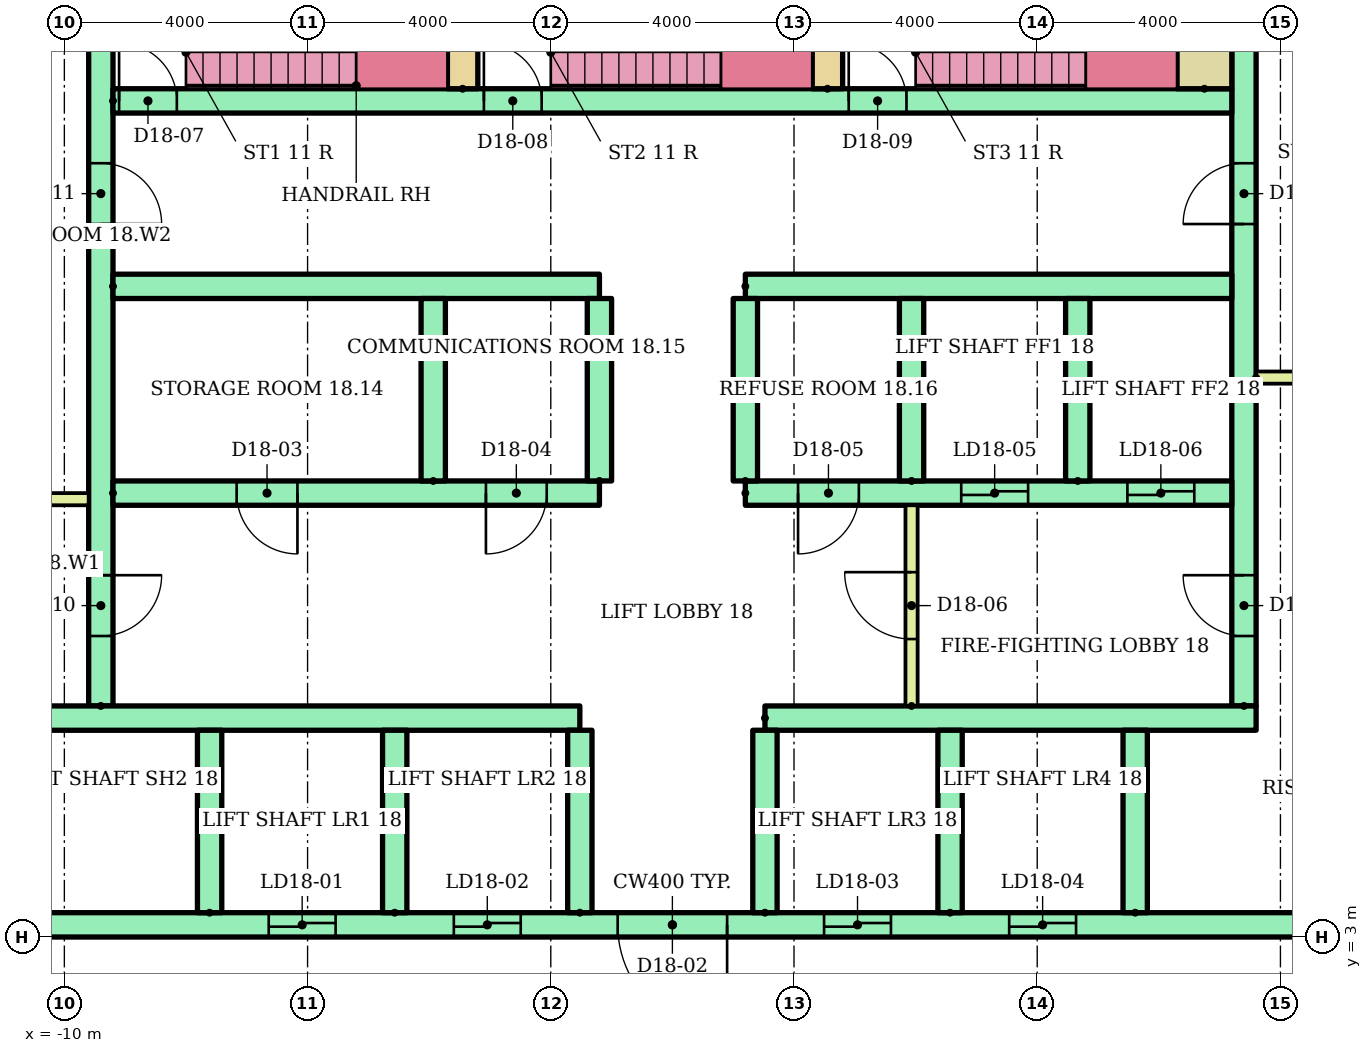
"""IFC4 building model, lengths in metres.
Left out: names, types, materials, properties, quantities, classifications, styles, units other than length and angle.
Written with IfcOpenShell. Run it as: python <this file> out.ifc"""

import sys

from ifc_helpers import new_model, si_unit, direction, frame, frame_2d, origin, place, context, subcontext, project, spatial, rectangle, extrude, element, fill, save


model = new_model("IFC4")
c1 = context("Model", 3, precision=1e-05, world=origin(), true_north=direction((0.0, 1.0)))
c2 = subcontext(c1, "Body", "Model", "MODEL_VIEW")
j1 = project(units=[si_unit("LENGTHUNIT", "METRE"), si_unit("PLANEANGLEUNIT", "RADIAN")], contexts=[c1])
p1 = place(None, origin())
s1 = spatial("IfcSite", under=j1, at=p1, CompositionType="ELEMENT")
p2 = place(p1, origin())
s2 = spatial("IfcBuilding", under=s1, at=p2, CompositionType="ELEMENT")
p3 = place(p2, frame((0.0, 0.0, 73.6)))
s3 = spatial("IfcBuildingStorey", under=s2, at=p3, CompositionType="ELEMENT", Elevation=73.6)
p4 = place(p3, frame((-9.4, 6.8, 0.0), z_axis=(0.0, 0.0, 1.0), x_axis=(0.0, 1.0, 0.0)))
e1 = element("IfcWall", 1, at=p4, inside=s3, PredefinedType="SHEAR", context=c2, shape_type="SweptSolid", body=[
    extrude(rectangle(XDim=12.7, YDim=0.4, at=frame_2d((6.35, 0.0))), origin(), (0.0, 0.0, 1.0), 3.62),
])
p5 = place(p4, frame((1.15, 0.0, 0.0)))
e2 = element("IfcOpeningElement", 2, at=p5, cuts=e1, PredefinedType="OPENING", context=c2, shape_type="SweptSolid", body=[
    extrude(rectangle(XDim=1.0, YDim=2.1, at=frame_2d((0.5, 1.05))), frame((0.0, 0.21, 0.0), z_axis=(0.0, -1.0, 0.0), x_axis=(1.0, 0.0, 0.0)), (0.0, 0.0, 1.0), 0.42),
])
p6 = place(p4, frame((7.925, 0.0, 0.0)))
e3 = element("IfcOpeningElement", 3, at=p6, cuts=e1, PredefinedType="OPENING", context=c2, shape_type="SweptSolid", body=[
    extrude(rectangle(XDim=1.0, YDim=2.1, at=frame_2d((0.5, 1.05))), frame((0.0, 0.21, 0.0), z_axis=(0.0, -1.0, 0.0), x_axis=(1.0, 0.0, 0.0)), (0.0, 0.0, 1.0), 0.42),
])
p7 = place(p3, frame((9.4, 6.8, 0.0), z_axis=(0.0, 0.0, 1.0), x_axis=(0.0, 1.0, 0.0)))
e4 = element("IfcWall", 4, at=p7, inside=s3, PredefinedType="SHEAR", context=c2, shape_type="SweptSolid", body=[
    extrude(rectangle(XDim=12.7, YDim=0.4, at=frame_2d((6.35, 0.0))), origin(), (0.0, 0.0, 1.0), 3.62),
])
p8 = place(p7, frame((1.15, 0.0, 0.0)))
e5 = element("IfcOpeningElement", 5, at=p8, cuts=e4, PredefinedType="OPENING", context=c2, shape_type="SweptSolid", body=[
    extrude(rectangle(XDim=1.0, YDim=2.1, at=frame_2d((0.5, 1.05))), frame((0.0, 0.21, 0.0), z_axis=(0.0, -1.0, 0.0), x_axis=(1.0, 0.0, 0.0)), (0.0, 0.0, 1.0), 0.42),
])
p9 = place(p7, frame((7.925, 0.0, 0.0)))
e6 = element("IfcOpeningElement", 6, at=p9, cuts=e4, PredefinedType="OPENING", context=c2, shape_type="SweptSolid", body=[
    extrude(rectangle(XDim=1.0, YDim=2.1, at=frame_2d((0.5, 1.05))), frame((0.0, 0.21, 0.0), z_axis=(0.0, -1.0, 0.0), x_axis=(1.0, 0.0, 0.0)), (0.0, 0.0, 1.0), 0.42),
])
p10 = place(p3, frame((-13.5, 3.2, 0.0)))
e7 = element("IfcWall", 7, at=p10, inside=s3, PredefinedType="SHEAR", context=c2, shape_type="SweptSolid", body=[
    extrude(rectangle(XDim=27.0, YDim=0.4, at=frame_2d((13.5, 0.0))), origin(), (0.0, 0.0, 1.0), 3.62),
])
p11 = place(p10, frame((6.861, 0.0, 0.0)))
e8 = element("IfcOpeningElement", 8, at=p11, cuts=e7, PredefinedType="OPENING", context=c2, shape_type="SweptSolid", body=[
    extrude(rectangle(XDim=1.1, YDim=2.1, at=frame_2d((0.55, 1.05))), frame((0.0, 0.21, 0.0), z_axis=(0.0, -1.0, 0.0), x_axis=(1.0, 0.0, 0.0)), (0.0, 0.0, 1.0), 0.42),
])
p12 = place(p10, frame((9.906, 0.0, 0.0)))
e9 = element("IfcOpeningElement", 9, at=p12, cuts=e7, PredefinedType="OPENING", context=c2, shape_type="SweptSolid", body=[
    extrude(rectangle(XDim=1.1, YDim=2.1, at=frame_2d((0.55, 1.05))), frame((0.0, 0.21, 0.0), z_axis=(0.0, -1.0, 0.0), x_axis=(1.0, 0.0, 0.0)), (0.0, 0.0, 1.0), 0.42),
])
p13 = place(p10, frame((15.994, 0.0, 0.0)))
e10 = element("IfcOpeningElement", 10, at=p13, cuts=e7, PredefinedType="OPENING", context=c2, shape_type="SweptSolid", body=[
    extrude(rectangle(XDim=1.1, YDim=2.1, at=frame_2d((0.55, 1.05))), frame((0.0, 0.21, 0.0), z_axis=(0.0, -1.0, 0.0), x_axis=(1.0, 0.0, 0.0)), (0.0, 0.0, 1.0), 0.42),
])
p14 = place(p10, frame((19.039, 0.0, 0.0)))
e11 = element("IfcOpeningElement", 11, at=p14, cuts=e7, PredefinedType="OPENING", context=c2, shape_type="SweptSolid", body=[
    extrude(rectangle(XDim=1.1, YDim=2.1, at=frame_2d((0.55, 1.05))), frame((0.0, 0.21, 0.0), z_axis=(0.0, -1.0, 0.0), x_axis=(1.0, 0.0, 0.0)), (0.0, 0.0, 1.0), 0.42),
])
p15 = place(p10, frame((12.6, 0.0, 0.0)))
e12 = element("IfcOpeningElement", 12, at=p15, cuts=e7, PredefinedType="OPENING", context=c2, shape_type="SweptSolid", body=[
    extrude(rectangle(XDim=1.8, YDim=2.1, at=frame_2d((0.9, 1.05))), frame((0.0, 0.21, 0.0), z_axis=(0.0, -1.0, 0.0), x_axis=(1.0, 0.0, 0.0)), (0.0, 0.0, 1.0), 0.42),
])
p16 = place(p3, frame((-13.5, 6.6, 0.0)))
e13 = element("IfcWall", 13, at=p16, inside=s3, PredefinedType="SHEAR", context=c2, shape_type="SweptSolid", body=[
    extrude(rectangle(XDim=11.978, YDim=0.4, at=frame_2d((5.989, 0.0))), origin(), (0.0, 0.0, 1.0), 3.62),
])
p17 = place(p3, frame((1.522, 6.6, 0.0)))
e14 = element("IfcWall", 14, at=p17, inside=s3, PredefinedType="SHEAR", context=c2, shape_type="SweptSolid", body=[
    extrude(rectangle(XDim=8.078, YDim=0.4, at=frame_2d((4.039, 0.0))), origin(), (0.0, 0.0, 1.0), 3.62),
])
for number, where, z_axis, x_axis in (
    (15, (-7.611, 3.4, 0.0), (0.0, 0.0, 1.0), (0.0, 1.0, 0.0)),
    (16, (-4.567, 3.4, 0.0), (0.0, 0.0, 1.0), (0.0, 1.0, 0.0)),
    (17, (-1.522, 3.4, 0.0), (0.0, 0.0, 1.0), (0.0, 1.0, 0.0)),
    (18, (1.522, 3.4, 0.0), (0.0, 0.0, 1.0), (0.0, 1.0, 0.0)),
    (19, (4.567, 3.4, 0.0), (0.0, 0.0, 1.0), (0.0, 1.0, 0.0)),
    (20, (7.611, 3.4, 0.0), (0.0, 0.0, 1.0), (0.0, 1.0, 0.0)),
):
    element("IfcWall", number, at=place(p3, frame(where, z_axis=z_axis, x_axis=x_axis)), inside=s3, PredefinedType="SHEAR", context=c2, shape_type="SweptSolid", body=[
        extrude(rectangle(XDim=3.0, YDim=0.4, at=frame_2d((1.5, 0.0))), origin(), (0.0, 0.0, 1.0), 3.62),
    ])
p18 = place(p3, frame((-9.2, 10.3, 0.0)))
e21 = element("IfcWall", 21, at=p18, inside=s3, PredefinedType="SHEAR", context=c2, shape_type="SweptSolid", body=[
    extrude(rectangle(XDim=8.0, YDim=0.4, at=frame_2d((4.0, 0.0))), origin(), (0.0, 0.0, 1.0), 3.62),
])
p19 = place(p18, frame((2.033, 0.0, 0.0)))
e22 = element("IfcOpeningElement", 22, at=p19, cuts=e21, PredefinedType="OPENING", context=c2, shape_type="SweptSolid", body=[
    extrude(rectangle(XDim=1.0, YDim=2.1, at=frame_2d((0.5, 1.05))), frame((0.0, 0.21, 0.0), z_axis=(0.0, -1.0, 0.0), x_axis=(1.0, 0.0, 0.0)), (0.0, 0.0, 1.0), 0.42),
])
p20 = place(p18, frame((6.133, 0.0, 0.0)))
e23 = element("IfcOpeningElement", 23, at=p20, cuts=e21, PredefinedType="OPENING", context=c2, shape_type="SweptSolid", body=[
    extrude(rectangle(XDim=1.0, YDim=2.1, at=frame_2d((0.5, 1.05))), frame((0.0, 0.21, 0.0), z_axis=(0.0, -1.0, 0.0), x_axis=(1.0, 0.0, 0.0)), (0.0, 0.0, 1.0), 0.42),
])
p21 = place(p3, frame((-9.2, 13.7, 0.0)))
e24 = element("IfcWall", 24, at=p21, inside=s3, PredefinedType="SHEAR", context=c2, shape_type="SweptSolid", body=[
    extrude(rectangle(XDim=8.0, YDim=0.4, at=frame_2d((4.0, 0.0))), origin(), (0.0, 0.0, 1.0), 3.62),
])
p22 = place(p3, frame((1.2, 10.3, 0.0)))
e25 = element("IfcWall", 25, at=p22, inside=s3, PredefinedType="SHEAR", context=c2, shape_type="SweptSolid", body=[
    extrude(rectangle(XDim=8.0, YDim=0.4, at=frame_2d((4.0, 0.0))), origin(), (0.0, 0.0, 1.0), 3.62),
])
p23 = place(p22, frame((3.55, 0.0, 0.0)))
e26 = element("IfcOpeningElement", 26, at=p23, cuts=e25, PredefinedType="OPENING", context=c2, shape_type="SweptSolid", body=[
    extrude(rectangle(XDim=1.1, YDim=2.1, at=frame_2d((0.55, 1.05))), frame((0.0, 0.21, 0.0), z_axis=(0.0, -1.0, 0.0), x_axis=(1.0, 0.0, 0.0)), (0.0, 0.0, 1.0), 0.42),
])
p24 = place(p22, frame((6.283, 0.0, 0.0)))
e27 = element("IfcOpeningElement", 27, at=p24, cuts=e25, PredefinedType="OPENING", context=c2, shape_type="SweptSolid", body=[
    extrude(rectangle(XDim=1.1, YDim=2.1, at=frame_2d((0.55, 1.05))), frame((0.0, 0.21, 0.0), z_axis=(0.0, -1.0, 0.0), x_axis=(1.0, 0.0, 0.0)), (0.0, 0.0, 1.0), 0.42),
])
p25 = place(p22, frame((0.867, 0.0, 0.0)))
e28 = element("IfcOpeningElement", 28, at=p25, cuts=e25, PredefinedType="OPENING", context=c2, shape_type="SweptSolid", body=[
    extrude(rectangle(XDim=1.0, YDim=2.1, at=frame_2d((0.5, 1.05))), frame((0.0, 0.21, 0.0), z_axis=(0.0, -1.0, 0.0), x_axis=(1.0, 0.0, 0.0)), (0.0, 0.0, 1.0), 0.42),
])
p26 = place(p3, frame((1.2, 13.7, 0.0)))
e29 = element("IfcWall", 29, at=p26, inside=s3, PredefinedType="SHEAR", context=c2, shape_type="SweptSolid", body=[
    extrude(rectangle(XDim=8.0, YDim=0.4, at=frame_2d((4.0, 0.0))), origin(), (0.0, 0.0, 1.0), 3.62),
])
for number, where, z_axis, x_axis in (
    (30, (-3.933, 10.5, 0.0), (0.0, 0.0, 1.0), (0.0, 1.0, 0.0)),
    (31, (-1.2, 10.5, 0.0), (0.0, 0.0, 1.0), (0.0, 1.0, 0.0)),
    (32, (1.2, 10.5, 0.0), (0.0, 0.0, 1.0), (0.0, 1.0, 0.0)),
    (33, (3.933, 10.5, 0.0), (0.0, 0.0, 1.0), (0.0, 1.0, 0.0)),
    (34, (6.667, 10.5, 0.0), (0.0, 0.0, 1.0), (0.0, 1.0, 0.0)),
):
    element("IfcWall", number, at=place(p3, frame(where, z_axis=z_axis, x_axis=x_axis)), inside=s3, PredefinedType="SHEAR", context=c2, shape_type="SweptSolid", body=[
        extrude(rectangle(XDim=3.0, YDim=0.4, at=frame_2d((1.5, 0.0))), origin(), (0.0, 0.0, 1.0), 3.62),
    ])
p27 = place(p3, frame((3.933, 6.8, 0.0), z_axis=(0.0, 0.0, 1.0), x_axis=(0.0, 1.0, 0.0)))
e35 = element("IfcWall", 35, at=p27, inside=s3, PredefinedType="PARTITIONING", context=c2, shape_type="SweptSolid", body=[
    extrude(rectangle(XDim=3.3, YDim=0.2, at=frame_2d((1.65, 0.0))), origin(), (0.0, 0.0, 1.0), 3.62),
])
p28 = place(p27, frame((1.1, 0.0, 0.0)))
e36 = element("IfcOpeningElement", 36, at=p28, cuts=e35, PredefinedType="OPENING", context=c2, shape_type="SweptSolid", body=[
    extrude(rectangle(XDim=1.1, YDim=2.1, at=frame_2d((0.55, 1.05))), frame((0.0, 0.11, 0.0), z_axis=(0.0, -1.0, 0.0), x_axis=(1.0, 0.0, 0.0)), (0.0, 0.0, 1.0), 0.22),
])
p29 = place(p3, frame((-9.2, 16.75, 0.0)))
e37 = element("IfcWall", 37, at=p29, inside=s3, PredefinedType="SHEAR", context=c2, shape_type="SweptSolid", body=[
    extrude(rectangle(XDim=18.4, YDim=0.4, at=frame_2d((9.2, 0.0))), origin(), (0.0, 0.0, 1.0), 3.62),
])
p30 = place(p29, frame((0.1, 0.0, 0.0)))
e38 = element("IfcOpeningElement", 38, at=p30, cuts=e37, PredefinedType="OPENING", context=c2, shape_type="SweptSolid", body=[
    extrude(rectangle(XDim=0.95, YDim=2.1, at=frame_2d((0.475, 1.05))), frame((0.0, 0.21, 0.0), z_axis=(0.0, -1.0, 0.0), x_axis=(1.0, 0.0, 0.0)), (0.0, 0.0, 1.0), 0.42),
])
p31 = place(p29, frame((6.1, 0.0, 0.0)))
e39 = element("IfcOpeningElement", 39, at=p31, cuts=e37, PredefinedType="OPENING", context=c2, shape_type="SweptSolid", body=[
    extrude(rectangle(XDim=0.95, YDim=2.1, at=frame_2d((0.475, 1.05))), frame((0.0, 0.21, 0.0), z_axis=(0.0, -1.0, 0.0), x_axis=(1.0, 0.0, 0.0)), (0.0, 0.0, 1.0), 0.42),
])
p32 = place(p29, frame((12.1, 0.0, 0.0)))
e40 = element("IfcOpeningElement", 40, at=p32, cuts=e37, PredefinedType="OPENING", context=c2, shape_type="SweptSolid", body=[
    extrude(rectangle(XDim=0.95, YDim=2.1, at=frame_2d((0.475, 1.05))), frame((0.0, 0.21, 0.0), z_axis=(0.0, -1.0, 0.0), x_axis=(1.0, 0.0, 0.0)), (0.0, 0.0, 1.0), 0.42),
])
for number, where, z_axis, x_axis in (
    (41, (-3.45, 16.95, 0.0), (0.0, 0.0, 1.0), (0.0, 1.0, 0.0)),
    (42, (2.55, 16.95, 0.0), (0.0, 0.0, 1.0), (0.0, 1.0, 0.0)),
):
    element("IfcWall", number, at=place(p3, frame(where, z_axis=z_axis, x_axis=x_axis)), inside=s3, PredefinedType="SHEAR", context=c2, shape_type="SweptSolid", body=[
        extrude(rectangle(XDim=2.55, YDim=0.5, at=frame_2d((1.275, 0.0))), origin(), (0.0, 0.0, 1.0), 3.62),
    ])
p33 = place(p3, frame((8.75, 16.95, 0.0), z_axis=(0.0, 0.0, 1.0), x_axis=(0.0, 1.0, 0.0)))
e43 = element("IfcWall", 43, at=p33, inside=s3, PredefinedType="SHEAR", context=c2, shape_type="SweptSolid", body=[
    extrude(rectangle(XDim=2.55, YDim=0.9, at=frame_2d((1.275, 0.0))), origin(), (0.0, 0.0, 1.0), 3.62),
])
for number, where in (
    (44, (-13.5, 10.2, 0.0)),
    (45, (9.6, 12.2, 0.0)),
):
    element("IfcWall", number, at=place(p3, frame(where)), inside=s3, PredefinedType="PARTITIONING", context=c2, shape_type="SweptSolid", body=[
        extrude(rectangle(XDim=3.9, YDim=0.2, at=frame_2d((1.95, 0.0))), origin(), (0.0, 0.0, 1.0), 3.62),
    ])
p34 = place(p11, origin())
e46 = element("IfcDoor", 46, at=p34, inside=s3, OperationType="SLIDING_TO_LEFT", PredefinedType="DOOR", context=c2, shape_type="SweptSolid", body=[
    extrude(rectangle(XDim=1.1, YDim=2.1, at=frame_2d((0.55, 1.05))), frame((0.0, 0.025, 0.0), z_axis=(0.0, -1.0, 0.0), x_axis=(1.0, 0.0, 0.0)), (0.0, 0.0, 1.0), 0.05),
])
fill(e8, e46)
p35 = place(p12, origin())
e47 = element("IfcDoor", 47, at=p35, inside=s3, OperationType="SLIDING_TO_LEFT", PredefinedType="DOOR", context=c2, shape_type="SweptSolid", body=[
    extrude(rectangle(XDim=1.1, YDim=2.1, at=frame_2d((0.55, 1.05))), frame((0.0, 0.025, 0.0), z_axis=(0.0, -1.0, 0.0), x_axis=(1.0, 0.0, 0.0)), (0.0, 0.0, 1.0), 0.05),
])
fill(e9, e47)
p36 = place(p13, origin())
e48 = element("IfcDoor", 48, at=p36, inside=s3, OperationType="SLIDING_TO_LEFT", PredefinedType="DOOR", context=c2, shape_type="SweptSolid", body=[
    extrude(rectangle(XDim=1.1, YDim=2.1, at=frame_2d((0.55, 1.05))), frame((0.0, 0.025, 0.0), z_axis=(0.0, -1.0, 0.0), x_axis=(1.0, 0.0, 0.0)), (0.0, 0.0, 1.0), 0.05),
])
fill(e10, e48)
p37 = place(p14, origin())
e49 = element("IfcDoor", 49, at=p37, inside=s3, OperationType="SLIDING_TO_LEFT", PredefinedType="DOOR", context=c2, shape_type="SweptSolid", body=[
    extrude(rectangle(XDim=1.1, YDim=2.1, at=frame_2d((0.55, 1.05))), frame((0.0, 0.025, 0.0), z_axis=(0.0, -1.0, 0.0), x_axis=(1.0, 0.0, 0.0)), (0.0, 0.0, 1.0), 0.05),
])
fill(e11, e49)
p38 = place(p15, frame((1.8, 0.0, 0.0), z_axis=(0.0, 0.0, 1.0), x_axis=(-1.0, 0.0, 0.0)))
e50 = element("IfcDoor", 50, at=p38, inside=s3, OperationType="DOUBLE_DOOR_SINGLE_SWING", PredefinedType="DOOR", context=c2, shape_type="SweptSolid", body=[
    extrude(rectangle(XDim=1.8, YDim=2.1, at=frame_2d((0.9, 1.05))), frame((0.0, 0.025, 0.0), z_axis=(0.0, -1.0, 0.0), x_axis=(1.0, 0.0, 0.0)), (0.0, 0.0, 1.0), 0.05),
])
fill(e12, e50)
p39 = place(p23, origin())
e51 = element("IfcDoor", 51, at=p39, inside=s3, OperationType="SLIDING_TO_LEFT", PredefinedType="DOOR", context=c2, shape_type="SweptSolid", body=[
    extrude(rectangle(XDim=1.1, YDim=2.1, at=frame_2d((0.55, 1.05))), frame((0.0, 0.025, 0.0), z_axis=(0.0, -1.0, 0.0), x_axis=(1.0, 0.0, 0.0)), (0.0, 0.0, 1.0), 0.05),
])
fill(e26, e51)
p40 = place(p24, origin())
e52 = element("IfcDoor", 52, at=p40, inside=s3, OperationType="SLIDING_TO_LEFT", PredefinedType="DOOR", context=c2, shape_type="SweptSolid", body=[
    extrude(rectangle(XDim=1.1, YDim=2.1, at=frame_2d((0.55, 1.05))), frame((0.0, 0.025, 0.0), z_axis=(0.0, -1.0, 0.0), x_axis=(1.0, 0.0, 0.0)), (0.0, 0.0, 1.0), 0.05),
])
fill(e27, e52)
p41 = place(p19, frame((1.0, 0.0, 0.0), z_axis=(0.0, 0.0, 1.0), x_axis=(-1.0, 0.0, 0.0)))
e53 = element("IfcDoor", 53, at=p41, inside=s3, OperationType="SINGLE_SWING_RIGHT", PredefinedType="DOOR", context=c2, shape_type="SweptSolid", body=[
    extrude(rectangle(XDim=1.0, YDim=2.1, at=frame_2d((0.5, 1.05))), frame((0.0, 0.025, 0.0), z_axis=(0.0, -1.0, 0.0), x_axis=(1.0, 0.0, 0.0)), (0.0, 0.0, 1.0), 0.05),
])
fill(e22, e53)
p42 = place(p20, frame((1.0, 0.0, 0.0), z_axis=(0.0, 0.0, 1.0), x_axis=(-1.0, 0.0, 0.0)))
e54 = element("IfcDoor", 54, at=p42, inside=s3, OperationType="SINGLE_SWING_LEFT", PredefinedType="DOOR", context=c2, shape_type="SweptSolid", body=[
    extrude(rectangle(XDim=1.0, YDim=2.1, at=frame_2d((0.5, 1.05))), frame((0.0, 0.025, 0.0), z_axis=(0.0, -1.0, 0.0), x_axis=(1.0, 0.0, 0.0)), (0.0, 0.0, 1.0), 0.05),
])
fill(e23, e54)
p43 = place(p25, frame((1.0, 0.0, 0.0), z_axis=(0.0, 0.0, 1.0), x_axis=(-1.0, 0.0, 0.0)))
e55 = element("IfcDoor", 55, at=p43, inside=s3, OperationType="SINGLE_SWING_LEFT", PredefinedType="DOOR", context=c2, shape_type="SweptSolid", body=[
    extrude(rectangle(XDim=1.0, YDim=2.1, at=frame_2d((0.5, 1.05))), frame((0.0, 0.025, 0.0), z_axis=(0.0, -1.0, 0.0), x_axis=(1.0, 0.0, 0.0)), (0.0, 0.0, 1.0), 0.05),
])
fill(e28, e55)
p44 = place(p28, origin())
e56 = element("IfcDoor", 56, at=p44, inside=s3, OperationType="SINGLE_SWING_RIGHT", PredefinedType="DOOR", context=c2, shape_type="SweptSolid", body=[
    extrude(rectangle(XDim=1.1, YDim=2.1, at=frame_2d((0.55, 1.05))), frame((0.0, 0.025, 0.0), z_axis=(0.0, -1.0, 0.0), x_axis=(1.0, 0.0, 0.0)), (0.0, 0.0, 1.0), 0.05),
])
fill(e36, e56)
p45 = place(p30, origin())
e57 = element("IfcDoor", 57, at=p45, inside=s3, OperationType="SINGLE_SWING_LEFT", PredefinedType="DOOR", context=c2, shape_type="SweptSolid", body=[
    extrude(rectangle(XDim=0.95, YDim=2.1, at=frame_2d((0.475, 1.05))), frame((0.0, 0.025, 0.0), z_axis=(0.0, -1.0, 0.0), x_axis=(1.0, 0.0, 0.0)), (0.0, 0.0, 1.0), 0.05),
])
fill(e38, e57)
p46 = place(p31, origin())
e58 = element("IfcDoor", 58, at=p46, inside=s3, OperationType="SINGLE_SWING_LEFT", PredefinedType="DOOR", context=c2, shape_type="SweptSolid", body=[
    extrude(rectangle(XDim=0.95, YDim=2.1, at=frame_2d((0.475, 1.05))), frame((0.0, 0.025, 0.0), z_axis=(0.0, -1.0, 0.0), x_axis=(1.0, 0.0, 0.0)), (0.0, 0.0, 1.0), 0.05),
])
fill(e39, e58)
p47 = place(p32, origin())
e59 = element("IfcDoor", 59, at=p47, inside=s3, OperationType="SINGLE_SWING_LEFT", PredefinedType="DOOR", context=c2, shape_type="SweptSolid", body=[
    extrude(rectangle(XDim=0.95, YDim=2.1, at=frame_2d((0.475, 1.05))), frame((0.0, 0.025, 0.0), z_axis=(0.0, -1.0, 0.0), x_axis=(1.0, 0.0, 0.0)), (0.0, 0.0, 1.0), 0.05),
])
fill(e40, e59)
p48 = place(p5, frame((1.0, 0.0, 0.0), z_axis=(0.0, 0.0, 1.0), x_axis=(-1.0, 0.0, 0.0)))
e60 = element("IfcDoor", 60, at=p48, inside=s3, OperationType="SINGLE_SWING_RIGHT", PredefinedType="DOOR", context=c2, shape_type="SweptSolid", body=[
    extrude(rectangle(XDim=1.0, YDim=2.1, at=frame_2d((0.5, 1.05))), frame((0.0, 0.025, 0.0), z_axis=(0.0, -1.0, 0.0), x_axis=(1.0, 0.0, 0.0)), (0.0, 0.0, 1.0), 0.05),
])
fill(e2, e60)
p49 = place(p6, frame((1.0, 0.0, 0.0), z_axis=(0.0, 0.0, 1.0), x_axis=(-1.0, 0.0, 0.0)))
e61 = element("IfcDoor", 61, at=p49, inside=s3, OperationType="SINGLE_SWING_LEFT", PredefinedType="DOOR", context=c2, shape_type="SweptSolid", body=[
    extrude(rectangle(XDim=1.0, YDim=2.1, at=frame_2d((0.5, 1.05))), frame((0.0, 0.025, 0.0), z_axis=(0.0, -1.0, 0.0), x_axis=(1.0, 0.0, 0.0)), (0.0, 0.0, 1.0), 0.05),
])
fill(e3, e61)
p50 = place(p8, origin())
e62 = element("IfcDoor", 62, at=p50, inside=s3, OperationType="SINGLE_SWING_RIGHT", PredefinedType="DOOR", context=c2, shape_type="SweptSolid", body=[
    extrude(rectangle(XDim=1.0, YDim=2.1, at=frame_2d((0.5, 1.05))), frame((0.0, 0.025, 0.0), z_axis=(0.0, -1.0, 0.0), x_axis=(1.0, 0.0, 0.0)), (0.0, 0.0, 1.0), 0.05),
])
fill(e5, e62)
p51 = place(p9, origin())
e63 = element("IfcDoor", 63, at=p51, inside=s3, OperationType="SINGLE_SWING_LEFT", PredefinedType="DOOR", context=c2, shape_type="SweptSolid", body=[
    extrude(rectangle(XDim=1.0, YDim=2.1, at=frame_2d((0.5, 1.05))), frame((0.0, 0.025, 0.0), z_axis=(0.0, -1.0, 0.0), x_axis=(1.0, 0.0, 0.0)), (0.0, 0.0, 1.0), 0.05),
])
fill(e6, e63)
save(model, sys.argv[1])
